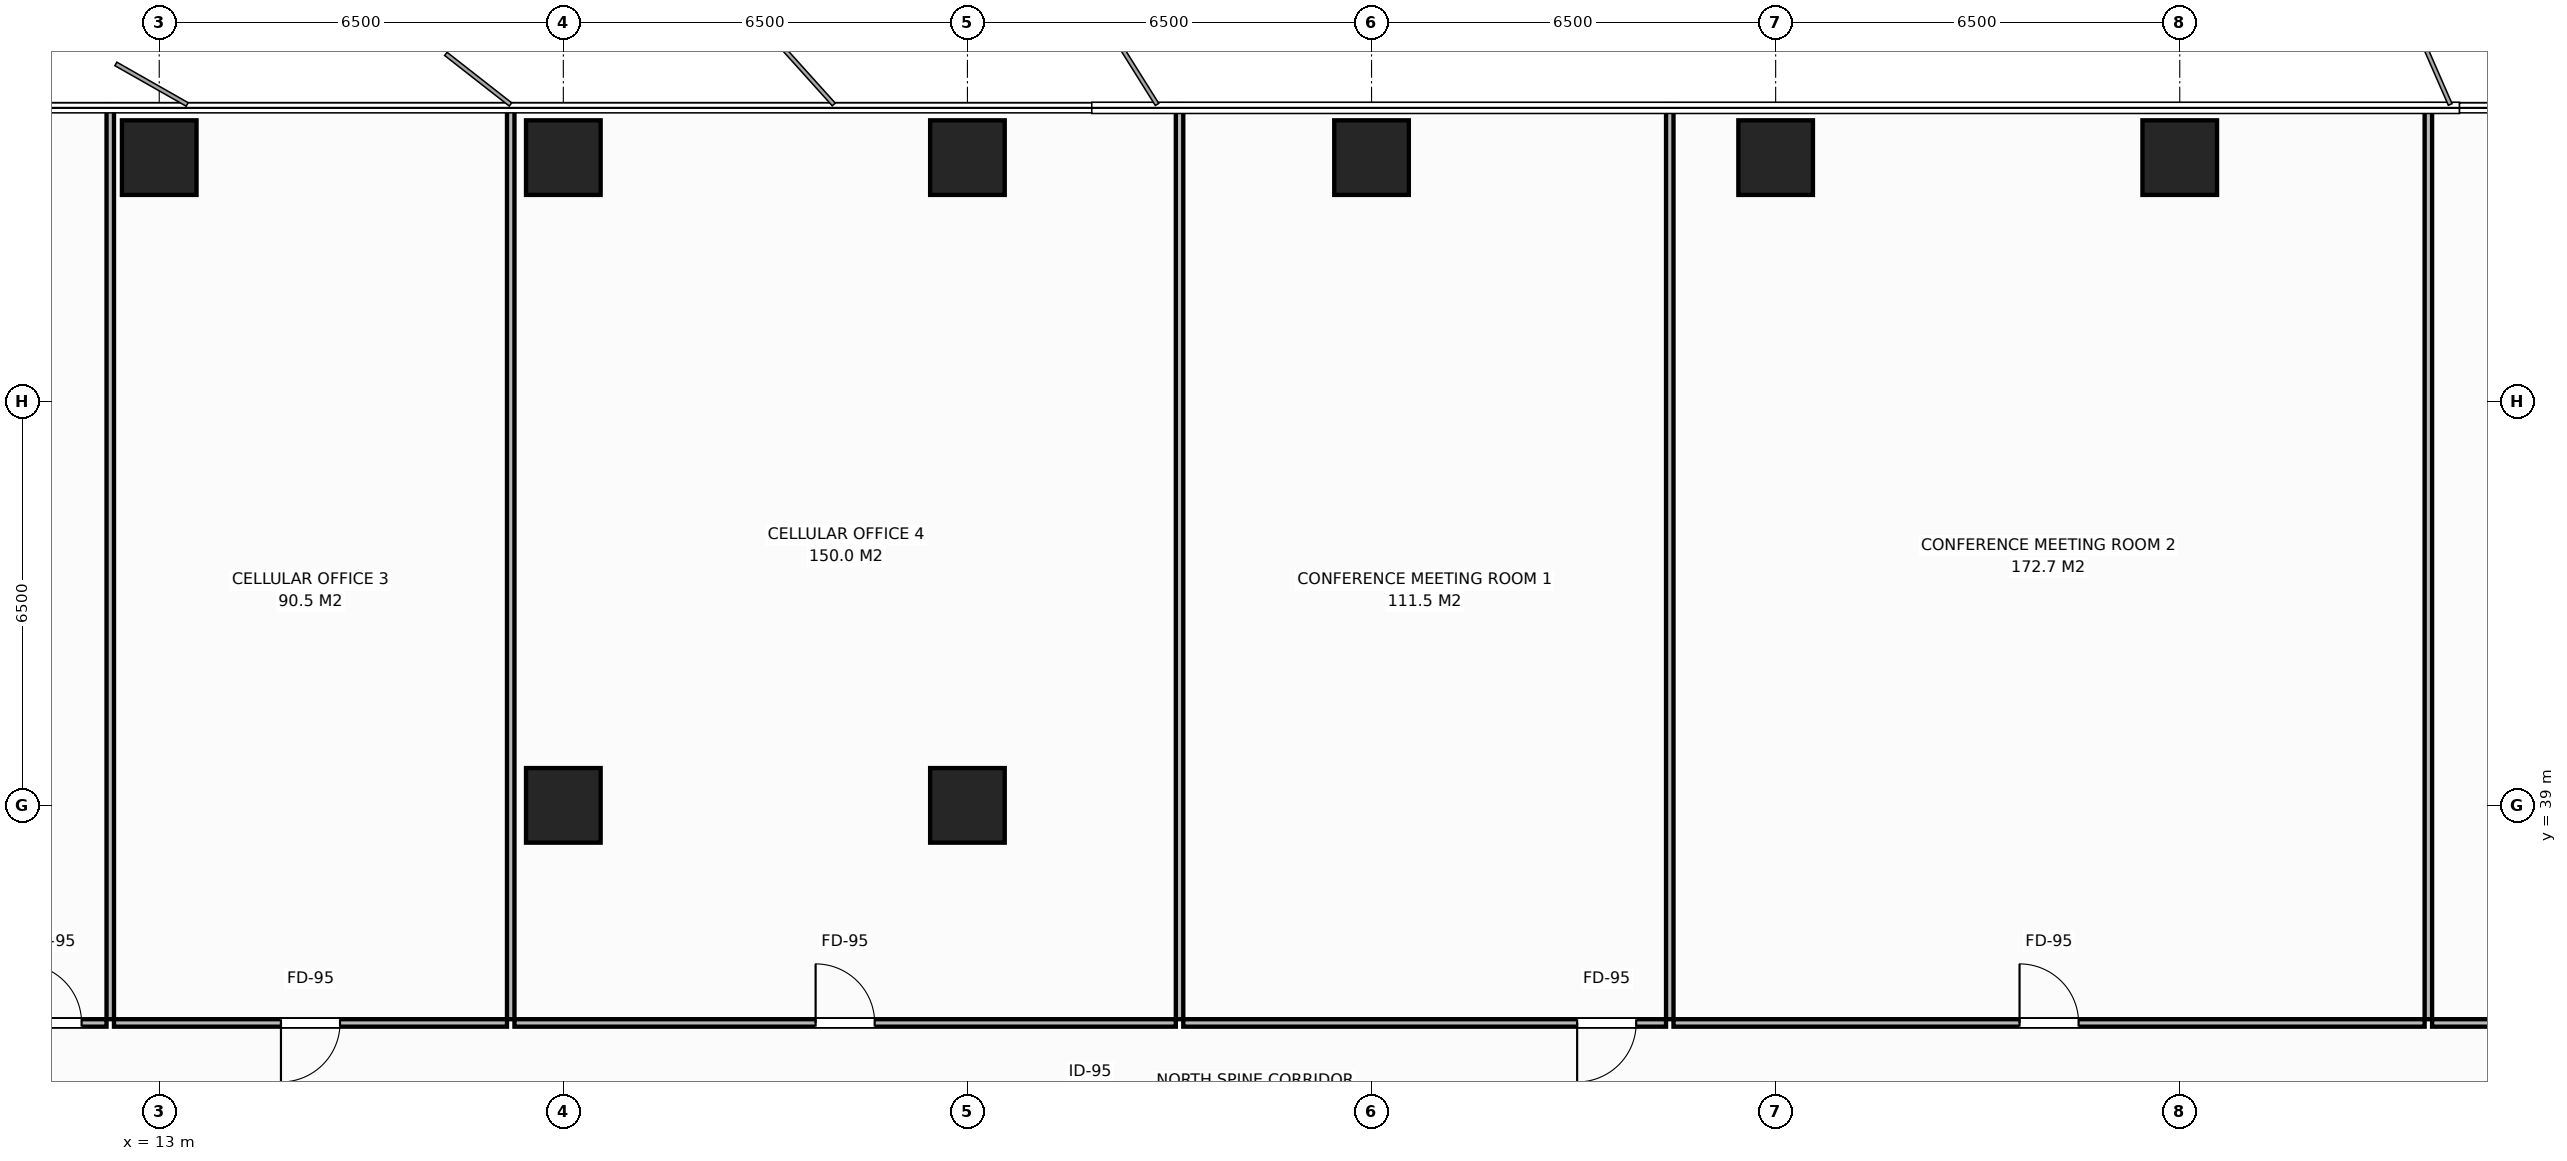
"""IFC4 building model, lengths in metres.
Left out: names, types, materials, properties, quantities, classifications, styles, units other than length and angle.
Written with IfcOpenShell. Run it as: python <this file> out.ifc"""

import sys

from ifc_helpers import new_model, si_unit, direction, frame, frame_2d, origin, origin_2d, place, context, subcontext, project, spatial, rectangle, extrude, element, fill, save


model = new_model("IFC4")
c1 = context("Model", 3, precision=1e-05, world=origin(), true_north=direction((0.0, 1.0)))
c2 = subcontext(c1, "Body", "Model", "MODEL_VIEW")
j1 = project(units=[si_unit("LENGTHUNIT", "METRE"), si_unit("PLANEANGLEUNIT", "RADIAN")], contexts=[c1])
p1 = place(None, origin())
s1 = spatial("IfcSite", under=j1, at=p1, CompositionType="ELEMENT")
p2 = place(p1, origin())
s2 = spatial("IfcBuilding", under=s1, at=p2, CompositionType="ELEMENT")
p3 = place(p2, frame((0.0, 0.0, 120.2)))
s3 = spatial("IfcBuildingStorey", under=s2, at=p3, CompositionType="ELEMENT", Elevation=120.2)
for number, where, z_axis, x_axis in (
    (1, (19.5, 39.0, 0.0), (0.0, 0.0, 1.0), (1.0, 0.0, 0.0)),
    (2, (26.0, 39.0, 0.0), (0.0, 0.0, 1.0), (1.0, 0.0, 0.0)),
    (3, (13.0, 49.42, 0.0), (0.0, 0.0, 1.0), (1.0, 0.0, 0.0)),
    (4, (19.5, 49.42, 0.0), (0.0, 0.0, 1.0), (1.0, 0.0, 0.0)),
    (5, (26.0, 49.42, 0.0), (0.0, 0.0, 1.0), (1.0, 0.0, 0.0)),
    (6, (32.5, 49.42, 0.0), (0.0, 0.0, 1.0), (1.0, 0.0, 0.0)),
    (7, (39.0, 49.42, 0.0), (0.0, 0.0, 1.0), (1.0, 0.0, 0.0)),
    (8, (45.5, 49.42, 0.0), (0.0, 0.0, 1.0), (1.0, 0.0, 0.0)),
):
    element("IfcColumn", number, at=place(p3, frame(where, z_axis=z_axis, x_axis=x_axis)), inside=s3, PredefinedType="COLUMN", context=c2, shape_type="SweptSolid", body=[
        extrude(rectangle(XDim=1.2, YDim=1.2, at=origin_2d()), origin(), (0.0, 0.0, 1.0), 3.8),
    ])
p4 = place(p3, frame((12.212, 35.56, 0.0), z_axis=(0.0, 0.0, 1.0), x_axis=(0.0, 1.0, 0.0)))
e9 = element("IfcWall", 9, at=p4, inside=s3, PredefinedType="PARTITIONING", context=c2, shape_type="SweptSolid", body=[
    extrude(rectangle(XDim=14.72, YDim=0.12, at=frame_2d((7.36, 0.0))), origin(), (0.0, 0.0, 1.0), 3.565),
])
p5 = place(p3, frame((1.98, 35.5, 0.0), z_axis=(0.0, 0.0, 1.0), x_axis=(1.0, 0.0, 0.0)))
e10 = element("IfcWall", 10, at=p5, inside=s3, PredefinedType="PARTITIONING", context=c2, shape_type="SweptSolid", body=[
    extrude(rectangle(XDim=10.172, YDim=0.12, at=frame_2d((5.086, 0.0))), origin(), (0.0, 0.0, 1.0), 3.565),
])
p6 = place(p5, frame((8.821, 0.0, 0.0)))
e11 = element("IfcOpeningElement", 11, at=p6, cuts=e10, PredefinedType="OPENING", context=c2, shape_type="SweptSolid", body=[
    extrude(rectangle(XDim=0.95, YDim=2.15, at=frame_2d((0.475, 1.075))), frame((0.0, 0.07, 0.0), z_axis=(0.0, -1.0, 0.0), x_axis=(1.0, 0.0, 0.0)), (0.0, 0.0, 1.0), 0.14),
])
p7 = place(p3, frame((18.654, 35.56, 0.0), z_axis=(0.0, 0.0, 1.0), x_axis=(0.0, 1.0, 0.0)))
e12 = element("IfcWall", 12, at=p7, inside=s3, PredefinedType="PARTITIONING", context=c2, shape_type="SweptSolid", body=[
    extrude(rectangle(XDim=14.72, YDim=0.12, at=frame_2d((7.36, 0.0))), origin(), (0.0, 0.0, 1.0), 3.565),
])
p8 = place(p3, frame((12.272, 35.5, 0.0), z_axis=(0.0, 0.0, 1.0), x_axis=(1.0, 0.0, 0.0)))
e13 = element("IfcWall", 13, at=p8, inside=s3, PredefinedType="PARTITIONING", context=c2, shape_type="SweptSolid", body=[
    extrude(rectangle(XDim=6.322, YDim=0.12, at=frame_2d((3.161, 0.0))), origin(), (0.0, 0.0, 1.0), 3.565),
])
p9 = place(p8, frame((2.686, 0.0, 0.0)))
e14 = element("IfcOpeningElement", 14, at=p9, cuts=e13, PredefinedType="OPENING", context=c2, shape_type="SweptSolid", body=[
    extrude(rectangle(XDim=0.95, YDim=2.15, at=frame_2d((0.475, 1.075))), frame((0.0, 0.07, 0.0), z_axis=(0.0, -1.0, 0.0), x_axis=(1.0, 0.0, 0.0)), (0.0, 0.0, 1.0), 0.14),
])
p10 = place(p3, frame((29.412, 35.56, 0.0), z_axis=(0.0, 0.0, 1.0), x_axis=(0.0, 1.0, 0.0)))
e15 = element("IfcWall", 15, at=p10, inside=s3, PredefinedType="PARTITIONING", context=c2, shape_type="SweptSolid", body=[
    extrude(rectangle(XDim=14.72, YDim=0.12, at=frame_2d((7.36, 0.0))), origin(), (0.0, 0.0, 1.0), 3.565),
])
p11 = place(p3, frame((18.714, 35.5, 0.0), z_axis=(0.0, 0.0, 1.0), x_axis=(1.0, 0.0, 0.0)))
e16 = element("IfcWall", 16, at=p11, inside=s3, PredefinedType="PARTITIONING", context=c2, shape_type="SweptSolid", body=[
    extrude(rectangle(XDim=10.638, YDim=0.12, at=frame_2d((5.319, 0.0))), origin(), (0.0, 0.0, 1.0), 3.565),
])
p12 = place(p11, frame((4.844, 0.0, 0.0)))
e17 = element("IfcOpeningElement", 17, at=p12, cuts=e16, PredefinedType="OPENING", context=c2, shape_type="SweptSolid", body=[
    extrude(rectangle(XDim=0.95, YDim=2.15, at=frame_2d((0.475, 1.075))), frame((0.0, 0.07, 0.0), z_axis=(0.0, -1.0, 0.0), x_axis=(1.0, 0.0, 0.0)), (0.0, 0.0, 1.0), 0.14),
])
p13 = place(p3, frame((37.297, 35.56, 0.0), z_axis=(0.0, 0.0, 1.0), x_axis=(0.0, 1.0, 0.0)))
e18 = element("IfcWall", 18, at=p13, inside=s3, PredefinedType="PARTITIONING", context=c2, shape_type="SweptSolid", body=[
    extrude(rectangle(XDim=14.72, YDim=0.12, at=frame_2d((7.36, 0.0))), origin(), (0.0, 0.0, 1.0), 3.565),
])
p14 = place(p3, frame((29.472, 35.5, 0.0), z_axis=(0.0, 0.0, 1.0), x_axis=(1.0, 0.0, 0.0)))
e19 = element("IfcWall", 19, at=p14, inside=s3, PredefinedType="PARTITIONING", context=c2, shape_type="SweptSolid", body=[
    extrude(rectangle(XDim=7.765, YDim=0.12, at=frame_2d((3.883, 0.0))), origin(), (0.0, 0.0, 1.0), 3.565),
])
p15 = place(p14, frame((6.335, 0.0, 0.0)))
e20 = element("IfcOpeningElement", 20, at=p15, cuts=e19, PredefinedType="OPENING", context=c2, shape_type="SweptSolid", body=[
    extrude(rectangle(XDim=0.95, YDim=2.15, at=frame_2d((0.475, 1.075))), frame((0.0, 0.07, 0.0), z_axis=(0.0, -1.0, 0.0), x_axis=(1.0, 0.0, 0.0)), (0.0, 0.0, 1.0), 0.14),
])
p16 = place(p3, frame((49.499, 35.56, 0.0), z_axis=(0.0, 0.0, 1.0), x_axis=(0.0, 1.0, 0.0)))
e21 = element("IfcWall", 21, at=p16, inside=s3, PredefinedType="PARTITIONING", context=c2, shape_type="SweptSolid", body=[
    extrude(rectangle(XDim=14.72, YDim=0.12, at=frame_2d((7.36, 0.0))), origin(), (0.0, 0.0, 1.0), 3.565),
])
p17 = place(p3, frame((37.357, 35.5, 0.0), z_axis=(0.0, 0.0, 1.0), x_axis=(1.0, 0.0, 0.0)))
e22 = element("IfcWall", 22, at=p17, inside=s3, PredefinedType="PARTITIONING", context=c2, shape_type="SweptSolid", body=[
    extrude(rectangle(XDim=12.082, YDim=0.12, at=frame_2d((6.041, 0.0))), origin(), (0.0, 0.0, 1.0), 3.565),
])
p18 = place(p17, frame((5.566, 0.0, 0.0)))
e23 = element("IfcOpeningElement", 23, at=p18, cuts=e22, PredefinedType="OPENING", context=c2, shape_type="SweptSolid", body=[
    extrude(rectangle(XDim=0.95, YDim=2.15, at=frame_2d((0.475, 1.075))), frame((0.0, 0.07, 0.0), z_axis=(0.0, -1.0, 0.0), x_axis=(1.0, 0.0, 0.0)), (0.0, 0.0, 1.0), 0.14),
])
p19 = place(p3, frame((49.559, 35.5, 0.0), z_axis=(0.0, 0.0, 1.0), x_axis=(1.0, 0.0, 0.0)))
e24 = element("IfcWall", 24, at=p19, inside=s3, PredefinedType="PARTITIONING", context=c2, shape_type="SweptSolid", body=[
    extrude(rectangle(XDim=9.202, YDim=0.12, at=frame_2d((4.601, 0.0))), origin(), (0.0, 0.0, 1.0), 3.565),
])
p20 = place(p19, frame((4.126, 0.0, 0.0)))
e25 = element("IfcOpeningElement", 25, at=p20, cuts=e24, PredefinedType="OPENING", context=c2, shape_type="SweptSolid", body=[
    extrude(rectangle(XDim=0.95, YDim=2.15, at=frame_2d((0.475, 1.075))), frame((0.0, 0.07, 0.0), z_axis=(0.0, -1.0, 0.0), x_axis=(1.0, 0.0, 0.0)), (0.0, 0.0, 1.0), 0.14),
])
p21 = place(p6, origin())
e26 = element("IfcDoor", 26, at=p21, inside=s3, OperationType="SINGLE_SWING_LEFT", PredefinedType="DOOR", context=c2, shape_type="SweptSolid", body=[
    extrude(rectangle(XDim=0.95, YDim=2.15, at=frame_2d((0.475, 1.075))), frame((0.0, 0.025, 0.0), z_axis=(0.0, -1.0, 0.0), x_axis=(1.0, 0.0, 0.0)), (0.0, 0.0, 1.0), 0.05),
])
fill(e11, e26)
p22 = place(p9, origin())
e27 = element("IfcDoor", 27, at=p22, inside=s3, OperationType="SINGLE_SWING_RIGHT", PredefinedType="DOOR", context=c2, shape_type="SweptSolid", body=[
    extrude(rectangle(XDim=0.95, YDim=2.15, at=frame_2d((0.475, 1.075))), frame((0.0, 0.025, 0.0), z_axis=(0.0, -1.0, 0.0), x_axis=(1.0, 0.0, 0.0)), (0.0, 0.0, 1.0), 0.05),
])
fill(e14, e27)
p23 = place(p12, origin())
e28 = element("IfcDoor", 28, at=p23, inside=s3, OperationType="SINGLE_SWING_LEFT", PredefinedType="DOOR", context=c2, shape_type="SweptSolid", body=[
    extrude(rectangle(XDim=0.95, YDim=2.15, at=frame_2d((0.475, 1.075))), frame((0.0, 0.025, 0.0), z_axis=(0.0, -1.0, 0.0), x_axis=(1.0, 0.0, 0.0)), (0.0, 0.0, 1.0), 0.05),
])
fill(e17, e28)
p24 = place(p15, origin())
e29 = element("IfcDoor", 29, at=p24, inside=s3, OperationType="SINGLE_SWING_RIGHT", PredefinedType="DOOR", context=c2, shape_type="SweptSolid", body=[
    extrude(rectangle(XDim=0.95, YDim=2.15, at=frame_2d((0.475, 1.075))), frame((0.0, 0.025, 0.0), z_axis=(0.0, -1.0, 0.0), x_axis=(1.0, 0.0, 0.0)), (0.0, 0.0, 1.0), 0.05),
])
fill(e20, e29)
p25 = place(p18, origin())
e30 = element("IfcDoor", 30, at=p25, inside=s3, OperationType="SINGLE_SWING_LEFT", PredefinedType="DOOR", context=c2, shape_type="SweptSolid", body=[
    extrude(rectangle(XDim=0.95, YDim=2.15, at=frame_2d((0.475, 1.075))), frame((0.0, 0.025, 0.0), z_axis=(0.0, -1.0, 0.0), x_axis=(1.0, 0.0, 0.0)), (0.0, 0.0, 1.0), 0.05),
])
fill(e23, e30)
save(model, sys.argv[1])
